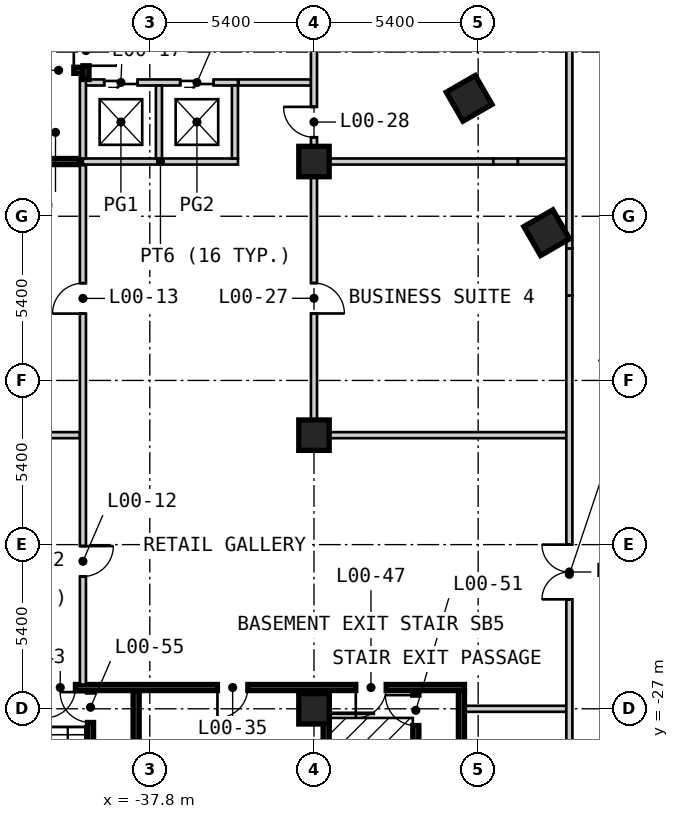
"""IFC4 building model, lengths in metres.
Left out: names, types, materials, properties, quantities, classifications, styles, units other than length and angle.
Written with IfcOpenShell. Run it as: python <this file> out.ifc"""

import sys

from ifc_helpers import new_model, si_unit, direction, frame, frame_2d, origin, origin_2d, place, context, subcontext, project, spatial, rectangle, extrude, element, fill, save


model = new_model("IFC4")
c1 = context("Model", 3, precision=1e-05, world=origin(), true_north=direction((0.0, 1.0)))
c2 = subcontext(c1, "Body", "Model", "MODEL_VIEW")
j1 = project(units=[si_unit("LENGTHUNIT", "METRE"), si_unit("PLANEANGLEUNIT", "RADIAN")], contexts=[c1])
p1 = place(None, origin())
s1 = spatial("IfcSite", under=j1, at=p1, CompositionType="ELEMENT")
p2 = place(p1, origin())
s2 = spatial("IfcBuilding", under=s1, at=p2, CompositionType="ELEMENT")
p3 = place(p2, origin())
s3 = spatial("IfcBuildingStorey", under=s2, at=p3, CompositionType="ELEMENT", Elevation=0.0)
for number, where, z_axis, x_axis in (
    (1, (-27.297, -6.921, 0.0), (0.0, 0.0, 1.0), (0.5, -0.866, 0.0)),
    (2, (-24.745, -11.341, 0.0), (0.0, 0.0, 1.0), (0.5, -0.866, 0.0)),
):
    element("IfcColumn", number, at=place(p3, frame(where, z_axis=z_axis, x_axis=x_axis)), inside=s3, PredefinedType="COLUMN", context=c2, shape_type="SweptSolid", body=[
        extrude(rectangle(XDim=1.1, YDim=1.1, at=origin_2d()), origin(), (0.0, 0.0, 1.0), 5.0),
    ])
for number, where, z_axis, x_axis in (
    (3, (-32.4, -27.0, 0.0), (0.0, 0.0, 1.0), (1.0, 0.0, 0.0)),
    (4, (-32.4, -18.0, 0.0), (0.0, 0.0, 1.0), (1.0, 0.0, 0.0)),
    (5, (-32.4, -9.0, 0.0), (0.0, 0.0, 1.0), (1.0, 0.0, 0.0)),
):
    element("IfcColumn", number, at=place(p3, frame(where, z_axis=z_axis, x_axis=x_axis)), inside=s3, PredefinedType="COLUMN", context=c2, shape_type="SweptSolid", body=[
        extrude(rectangle(XDim=1.0, YDim=1.0, at=origin_2d()), origin(), (0.0, 0.0, 1.0), 5.0),
    ])
p4 = place(p3, frame((-27.45, -27.0, 0.0), z_axis=(0.0, 0.0, 1.0), x_axis=(1.0, 0.0, 0.0)))
e6 = element("IfcWall", 6, at=p4, inside=s3, PredefinedType="SOLIDWALL", context=c2, shape_type="SweptSolid", body=[
    extrude(rectangle(XDim=3.35, YDim=0.2, at=frame_2d((1.675, 0.0))), origin(), (0.0, 0.0, 1.0), 4.55),
])
p5 = place(p3, frame((-42.6, -26.3, 0.0), z_axis=(0.0, 0.0, 1.0), x_axis=(1.0, 0.0, 0.0)))
e7 = element("IfcWall", 7, at=p5, inside=s3, PredefinedType="SOLIDWALL", context=c2, shape_type="SweptSolid", body=[
    extrude(rectangle(XDim=15.15, YDim=0.2, at=frame_2d((7.575, 0.0))), origin(), (0.0, 0.0, 1.0), 4.55),
])
p6 = place(p5, frame((8.025, 0.0, 0.0), z_axis=(0.0, 0.0, 1.0), x_axis=(-1.0, 0.0, 0.0)))
e8 = element("IfcOpeningElement", 8, at=p6, cuts=e7, PredefinedType="OPENING", context=c2, shape_type="SweptSolid", body=[
    extrude(rectangle(XDim=1.0, YDim=2.1, at=frame_2d((0.5, 1.05))), frame((0.0, 0.11, 0.0), z_axis=(0.0, -1.0, 0.0), x_axis=(1.0, 0.0, 0.0)), (0.0, 0.0, 1.0), 0.22),
])
p7 = place(p5, frame((2.354, 0.0, 0.0), z_axis=(0.0, 0.0, 1.0), x_axis=(-1.0, 0.0, 0.0)))
e9 = element("IfcOpeningElement", 9, at=p7, cuts=e7, PredefinedType="OPENING", context=c2, shape_type="SweptSolid", body=[
    extrude(rectangle(XDim=1.0, YDim=2.1, at=frame_2d((0.5, 1.05))), frame((0.0, 0.11, 0.0), z_axis=(0.0, -1.0, 0.0), x_axis=(1.0, 0.0, 0.0)), (0.0, 0.0, 1.0), 0.22),
])
p8 = place(p5, frame((12.575, 0.0, 0.0), z_axis=(0.0, 0.0, 1.0), x_axis=(-1.0, 0.0, 0.0)))
e10 = element("IfcOpeningElement", 10, at=p8, cuts=e7, PredefinedType="OPENING", context=c2, shape_type="SweptSolid", body=[
    extrude(rectangle(XDim=1.0, YDim=2.1, at=frame_2d((0.5, 1.05))), frame((0.0, 0.11, 0.0), z_axis=(0.0, -1.0, 0.0), x_axis=(1.0, 0.0, 0.0)), (0.0, 0.0, 1.0), 0.22),
])
p9 = place(p3, frame((-47.75, -18.0, 0.0), z_axis=(0.0, 0.0, 1.0), x_axis=(1.0, 0.0, 0.0)))
e11 = element("IfcWall", 11, at=p9, inside=s3, PredefinedType="PARTITIONING", context=c2, shape_type="SweptSolid", body=[
    extrude(rectangle(XDim=7.65, YDim=0.2, at=frame_2d((3.825, 0.0))), origin(), (0.0, 0.0, 1.0), 4.55),
])
p10 = place(p3, frame((-32.4, -18.0, 0.0), z_axis=(0.0, 0.0, 1.0), x_axis=(1.0, 0.0, 0.0)))
e12 = element("IfcWall", 12, at=p10, inside=s3, PredefinedType="PARTITIONING", context=c2, shape_type="SweptSolid", body=[
    extrude(rectangle(XDim=8.4, YDim=0.2, at=frame_2d((4.2, 0.0))), origin(), (0.0, 0.0, 1.0), 4.55),
])
p11 = place(p3, frame((-47.7, -9.0, 0.0), z_axis=(0.0, 0.0, 1.0), x_axis=(1.0, 0.0, 0.0)))
e13 = element("IfcWall", 13, at=p11, inside=s3, PredefinedType="SOLIDWALL", context=c2, shape_type="SweptSolid", body=[
    extrude(rectangle(XDim=7.58, YDim=0.2, at=frame_2d((3.79, 0.0))), origin(), (0.0, 0.0, 1.0), 4.55),
])
p12 = place(p3, frame((-40.0, -9.0, 0.0), z_axis=(0.0, 0.0, 1.0), x_axis=(1.0, 0.0, 0.0)))
e14 = element("IfcWall", 14, at=p12, inside=s3, PredefinedType="SOLIDWALL", context=c2, shape_type="SweptSolid", body=[
    extrude(rectangle(XDim=5.1, YDim=0.2, at=frame_2d((2.55, 0.0))), origin(), (0.0, 0.0, 1.0), 4.55),
])
p13 = place(p3, frame((-32.3, -9.0, 0.0), z_axis=(0.0, 0.0, 1.0), x_axis=(1.0, 0.0, 0.0)))
e15 = element("IfcWall", 15, at=p13, inside=s3, PredefinedType="PARTITIONING", context=c2, shape_type="SweptSolid", body=[
    extrude(rectangle(XDim=5.799, YDim=0.2, at=frame_2d((2.899, 0.0))), origin(), (0.0, 0.0, 1.0), 4.55),
])
p14 = place(p3, frame((-26.501, -9.0, 0.0), z_axis=(0.0, 0.0, 1.0), x_axis=(1.0, 0.0, 0.0)))
e16 = element("IfcWall", 16, at=p14, inside=s3, PredefinedType="PARTITIONING", context=c2, shape_type="SweptSolid", body=[
    extrude(rectangle(XDim=0.809, YDim=0.2, at=frame_2d((0.405, 0.0))), origin(), (0.0, 0.0, 1.0), 3.82),
])
p15 = place(p3, frame((-25.692, -9.0, 0.0), z_axis=(0.0, 0.0, 1.0), x_axis=(1.0, 0.0, 0.0)))
e17 = element("IfcWall", 17, at=p15, inside=s3, PredefinedType="PARTITIONING", context=c2, shape_type="SweptSolid", body=[
    extrude(rectangle(XDim=1.592, YDim=0.2, at=frame_2d((0.796, 0.0))), origin(), (0.0, 0.0, 1.0), 4.55),
])
p16 = place(p3, frame((-40.0, -6.4, 0.0), z_axis=(0.0, 0.0, 1.0), x_axis=(1.0, 0.0, 0.0)))
e18 = element("IfcWall", 18, at=p16, inside=s3, PredefinedType="SOLIDWALL", context=c2, shape_type="SweptSolid", body=[
    extrude(rectangle(XDim=5.1, YDim=0.2, at=frame_2d((2.55, 0.0))), origin(), (0.0, 0.0, 1.0), 4.55),
])
p17 = place(p16, frame((0.7, 0.0, 0.0)))
e19 = element("IfcOpeningElement", 19, at=p17, cuts=e18, PredefinedType="OPENING", context=c2, shape_type="SweptSolid", body=[
    extrude(rectangle(XDim=1.1, YDim=2.1, at=frame_2d((0.55, 1.05))), frame((0.0, 0.11, 0.0), z_axis=(0.0, -1.0, 0.0), x_axis=(1.0, 0.0, 0.0)), (0.0, 0.0, 1.0), 0.22),
])
p18 = place(p16, frame((3.2, 0.0, 0.0)))
e20 = element("IfcOpeningElement", 20, at=p18, cuts=e18, PredefinedType="OPENING", context=c2, shape_type="SweptSolid", body=[
    extrude(rectangle(XDim=1.1, YDim=2.1, at=frame_2d((0.55, 1.05))), frame((0.0, 0.11, 0.0), z_axis=(0.0, -1.0, 0.0), x_axis=(1.0, 0.0, 0.0)), (0.0, 0.0, 1.0), 0.22),
])
p19 = place(p3, frame((-34.88, -6.4, 0.0), z_axis=(0.0, 0.0, 1.0), x_axis=(1.0, 0.0, 0.0)))
e21 = element("IfcWall", 21, at=p19, inside=s3, PredefinedType="PARTITIONING", context=c2, shape_type="SweptSolid", body=[
    extrude(rectangle(XDim=2.38, YDim=0.2, at=frame_2d((1.19, 0.0))), origin(), (0.0, 0.0, 1.0), 4.55),
])
p20 = place(p3, frame((-42.75, -6.0, 0.0), z_axis=(0.0, 0.0, 1.0), x_axis=(1.0, 0.0, 0.0)))
e22 = element("IfcWall", 22, at=p20, inside=s3, PredefinedType="SOLIDWALL", context=c2, shape_type="SweptSolid", body=[
    extrude(rectangle(XDim=2.75, YDim=0.2, at=frame_2d((1.375, 0.0))), origin(), (0.0, 0.0, 1.0), 4.55),
])
p21 = place(p20, frame((2.45, 0.0, 0.0), z_axis=(0.0, 0.0, 1.0), x_axis=(-1.0, 0.0, 0.0)))
e23 = element("IfcOpeningElement", 23, at=p21, cuts=e22, PredefinedType="OPENING", context=c2, shape_type="SweptSolid", body=[
    extrude(rectangle(XDim=1.0, YDim=2.1, at=frame_2d((0.5, 1.05))), frame((0.0, 0.11, 0.0), z_axis=(0.0, -1.0, 0.0), x_axis=(1.0, 0.0, 0.0)), (0.0, 0.0, 1.0), 0.22),
])
p22 = place(p3, frame((-40.0, -26.2, 0.0), z_axis=(0.0, 0.0, 1.0), x_axis=(0.0, 1.0, 0.0)))
e24 = element("IfcWall", 24, at=p22, inside=s3, PredefinedType="PARTITIONING", context=c2, shape_type="SweptSolid", body=[
    extrude(rectangle(XDim=17.08, YDim=0.2, at=frame_2d((8.54, 0.0))), origin(), (0.0, 0.0, 1.0), 4.55),
])
p23 = place(p22, frame((3.552, 0.0, 0.0)))
e25 = element("IfcOpeningElement", 25, at=p23, cuts=e24, PredefinedType="OPENING", context=c2, shape_type="SweptSolid", body=[
    extrude(rectangle(XDim=1.0, YDim=2.1, at=frame_2d((0.5, 1.05))), frame((0.0, 0.11, 0.0), z_axis=(0.0, -1.0, 0.0), x_axis=(1.0, 0.0, 0.0)), (0.0, 0.0, 1.0), 0.22),
])
p24 = place(p22, frame((12.198, 0.0, 0.0)))
e26 = element("IfcOpeningElement", 26, at=p24, cuts=e24, PredefinedType="OPENING", context=c2, shape_type="SweptSolid", body=[
    extrude(rectangle(XDim=1.0, YDim=2.1, at=frame_2d((0.5, 1.05))), frame((0.0, 0.11, 0.0), z_axis=(0.0, -1.0, 0.0), x_axis=(1.0, 0.0, 0.0)), (0.0, 0.0, 1.0), 0.22),
])
p25 = place(p3, frame((-40.0, -8.9, 0.0), z_axis=(0.0, 0.0, 1.0), x_axis=(0.0, 1.0, 0.0)))
e27 = element("IfcWall", 27, at=p25, inside=s3, PredefinedType="SOLIDWALL", context=c2, shape_type="SweptSolid", body=[
    extrude(rectangle(XDim=2.8, YDim=0.2, at=frame_2d((1.4, 0.0))), origin(), (0.0, 0.0, 1.0), 4.55),
])
p26 = place(p3, frame((-39.9, -6.3, 0.0), z_axis=(0.0, 0.0, 1.0), x_axis=(0.0, 1.0, 0.0)))
e28 = element("IfcWall", 28, at=p26, inside=s3, PredefinedType="SOLIDWALL", context=c2, shape_type="SweptSolid", body=[
    extrude(rectangle(XDim=33.3, YDim=0.2, at=frame_2d((16.65, 0.0))), origin(), (0.0, 0.0, 1.0), 4.55),
])
p27 = place(p26, frame((10.302, 0.0, 0.0)))
e29 = element("IfcOpeningElement", 29, at=p27, cuts=e28, PredefinedType="OPENING", context=c2, shape_type="SweptSolid", body=[
    extrude(rectangle(XDim=1.0, YDim=2.1, at=frame_2d((0.5, 1.05))), frame((0.0, 0.11, 0.0), z_axis=(0.0, -1.0, 0.0), x_axis=(1.0, 0.0, 0.0)), (0.0, 0.0, 1.0), 0.22),
])
p28 = place(p26, frame((19.3, 0.0, 0.0)))
e30 = element("IfcOpeningElement", 30, at=p28, cuts=e28, PredefinedType="OPENING", context=c2, shape_type="SweptSolid", body=[
    extrude(rectangle(XDim=1.0, YDim=2.1, at=frame_2d((0.5, 1.05))), frame((0.0, 0.11, 0.0), z_axis=(0.0, -1.0, 0.0), x_axis=(1.0, 0.0, 0.0)), (0.0, 0.0, 1.0), 0.22),
])
p29 = place(p26, frame((28.298, 0.0, 0.0)))
e31 = element("IfcOpeningElement", 31, at=p29, cuts=e28, PredefinedType="OPENING", context=c2, shape_type="SweptSolid", body=[
    extrude(rectangle(XDim=1.0, YDim=2.1, at=frame_2d((0.5, 1.05))), frame((0.0, 0.11, 0.0), z_axis=(0.0, -1.0, 0.0), x_axis=(1.0, 0.0, 0.0)), (0.0, 0.0, 1.0), 0.22),
])
p30 = place(p26, frame((1.45, 0.0, 0.0), z_axis=(0.0, 0.0, 1.0), x_axis=(-1.0, 0.0, 0.0)))
e32 = element("IfcOpeningElement", 32, at=p30, cuts=e28, PredefinedType="OPENING", context=c2, shape_type="SweptSolid", body=[
    extrude(rectangle(XDim=1.0, YDim=2.1, at=frame_2d((0.5, 1.05))), frame((0.0, 0.11, 0.0), z_axis=(0.0, -1.0, 0.0), x_axis=(1.0, 0.0, 0.0)), (0.0, 0.0, 1.0), 0.22),
])
p31 = place(p3, frame((-39.75, -31.7, 0.0), z_axis=(0.0, 0.0, 1.0), x_axis=(0.0, 1.0, 0.0)))
e33 = element("IfcWall", 33, at=p31, inside=s3, PredefinedType="SOLIDWALL", context=c2, shape_type="SweptSolid", body=[
    extrude(rectangle(XDim=5.3, YDim=0.2, at=frame_2d((2.65, 0.0))), origin(), (0.0, 0.0, 1.0), 4.55),
])
p32 = place(p31, frame((5.25, 0.0, 0.0), z_axis=(0.0, 0.0, 1.0), x_axis=(-1.0, 0.0, 0.0)))
e34 = element("IfcOpeningElement", 34, at=p32, cuts=e33, PredefinedType="OPENING", context=c2, shape_type="SweptSolid", body=[
    extrude(rectangle(XDim=1.0, YDim=2.1, at=frame_2d((0.5, 1.05))), frame((0.0, 0.11, 0.0), z_axis=(0.0, -1.0, 0.0), x_axis=(1.0, 0.0, 0.0)), (0.0, 0.0, 1.0), 0.22),
])
p33 = place(p3, frame((-38.25, -31.7, 0.0), z_axis=(0.0, 0.0, 1.0), x_axis=(0.0, 1.0, 0.0)))
e35 = element("IfcWall", 35, at=p33, inside=s3, PredefinedType="SOLIDWALL", context=c2, shape_type="SweptSolid", body=[
    extrude(rectangle(XDim=5.3, YDim=0.2, at=frame_2d((2.65, 0.0))), origin(), (0.0, 0.0, 1.0), 4.55),
])
for number, where, z_axis, x_axis in (
    (36, (-37.5, -8.9, 0.0), (0.0, 0.0, 1.0), (0.0, 1.0, 0.0)),
    (37, (-35.0, -8.9, 0.0), (0.0, 0.0, 1.0), (0.0, 1.0, 0.0)),
):
    element("IfcWall", number, at=place(p3, frame(where, z_axis=z_axis, x_axis=x_axis)), inside=s3, PredefinedType="SOLIDWALL", context=c2, shape_type="SweptSolid", body=[
        extrude(rectangle(XDim=2.4, YDim=0.2, at=frame_2d((1.2, 0.0))), origin(), (0.0, 0.0, 1.0), 4.55),
    ])
p34 = place(p3, frame((-32.4, -17.9, 0.0), z_axis=(0.0, 0.0, 1.0), x_axis=(0.0, 1.0, 0.0)))
e38 = element("IfcWall", 38, at=p34, inside=s3, PredefinedType="PARTITIONING", context=c2, shape_type="SweptSolid", body=[
    extrude(rectangle(XDim=17.8, YDim=0.2, at=frame_2d((8.9, 0.0))), origin(), (0.0, 0.0, 1.0), 4.55),
])
p35 = place(p34, frame((4.902, 0.0, 0.0), z_axis=(0.0, 0.0, 1.0), x_axis=(-1.0, 0.0, 0.0)))
e39 = element("IfcOpeningElement", 39, at=p35, cuts=e38, PredefinedType="OPENING", context=c2, shape_type="SweptSolid", body=[
    extrude(rectangle(XDim=1.0, YDim=2.1, at=frame_2d((0.5, 1.05))), frame((0.0, 0.11, 0.0), z_axis=(0.0, -1.0, 0.0), x_axis=(1.0, 0.0, 0.0)), (0.0, 0.0, 1.0), 0.22),
])
p36 = place(p34, frame((10.698, 0.0, 0.0), z_axis=(0.0, 0.0, 1.0), x_axis=(-1.0, 0.0, 0.0)))
e40 = element("IfcOpeningElement", 40, at=p36, cuts=e38, PredefinedType="OPENING", context=c2, shape_type="SweptSolid", body=[
    extrude(rectangle(XDim=1.0, YDim=2.1, at=frame_2d((0.5, 1.05))), frame((0.0, 0.11, 0.0), z_axis=(0.0, -1.0, 0.0), x_axis=(1.0, 0.0, 0.0)), (0.0, 0.0, 1.0), 0.22),
])
p37 = place(p3, frame((-32.0, -31.7, 0.0), z_axis=(0.0, 0.0, 1.0), x_axis=(0.0, 1.0, 0.0)))
e41 = element("IfcWall", 41, at=p37, inside=s3, PredefinedType="SOLIDWALL", context=c2, shape_type="SweptSolid", body=[
    extrude(rectangle(XDim=5.3, YDim=0.2, at=frame_2d((2.65, 0.0))), origin(), (0.0, 0.0, 1.0), 4.55),
])
p38 = place(p3, frame((-29.05, -31.7, 0.0), z_axis=(0.0, 0.0, 1.0), x_axis=(0.0, 1.0, 0.0)))
e42 = element("IfcWall", 42, at=p38, inside=s3, PredefinedType="SOLIDWALL", context=c2, shape_type="SweptSolid", body=[
    extrude(rectangle(XDim=5.3, YDim=0.2, at=frame_2d((2.65, 0.0))), origin(), (0.0, 0.0, 1.0), 4.55),
])
p39 = place(p38, frame((5.15, 0.0, 0.0), z_axis=(0.0, 0.0, 1.0), x_axis=(-1.0, 0.0, 0.0)))
e43 = element("IfcOpeningElement", 43, at=p39, cuts=e42, PredefinedType="OPENING", context=c2, shape_type="SweptSolid", body=[
    extrude(rectangle(XDim=1.0, YDim=2.1, at=frame_2d((0.5, 1.05))), frame((0.0, 0.11, 0.0), z_axis=(0.0, -1.0, 0.0), x_axis=(1.0, 0.0, 0.0)), (0.0, 0.0, 1.0), 0.22),
])
p40 = place(p3, frame((-27.55, -31.7, 0.0), z_axis=(0.0, 0.0, 1.0), x_axis=(0.0, 1.0, 0.0)))
e44 = element("IfcWall", 44, at=p40, inside=s3, PredefinedType="SOLIDWALL", context=c2, shape_type="SweptSolid", body=[
    extrude(rectangle(XDim=5.3, YDim=0.2, at=frame_2d((2.65, 0.0))), origin(), (0.0, 0.0, 1.0), 4.55),
])
p41 = place(p3, frame((-24.0, -31.75, 0.0), z_axis=(0.0, 0.0, 1.0), x_axis=(0.0, 1.0, 0.0)))
e45 = element("IfcWall", 45, at=p41, inside=s3, PredefinedType="SOLIDWALL", context=c2, shape_type="SweptSolid", body=[
    extrude(rectangle(XDim=18.346, YDim=0.2, at=frame_2d((9.173, 0.0))), origin(), (0.0, 0.0, 1.0), 4.55),
])
p42 = place(p41, frame((2.05, 0.0, 0.0), z_axis=(0.0, 0.0, 1.0), x_axis=(-1.0, 0.0, 0.0)))
e46 = element("IfcOpeningElement", 46, at=p42, cuts=e45, PredefinedType="OPENING", context=c2, shape_type="SweptSolid", body=[
    extrude(rectangle(XDim=1.0, YDim=2.1, at=frame_2d((0.5, 1.05))), frame((0.0, 0.11, 0.0), z_axis=(0.0, -1.0, 0.0), x_axis=(1.0, 0.0, 0.0)), (0.0, 0.0, 1.0), 0.22),
])
p43 = place(p41, frame((8.35, 0.0, 0.0)))
e47 = element("IfcOpeningElement", 47, at=p43, cuts=e45, PredefinedType="OPENING", context=c2, shape_type="SweptSolid", body=[
    extrude(rectangle(XDim=1.8, YDim=2.1, at=frame_2d((0.9, 1.05))), frame((0.0, 0.11, 0.0), z_axis=(0.0, -1.0, 0.0), x_axis=(1.0, 0.0, 0.0)), (0.0, 0.0, 1.0), 0.22),
])
p44 = place(p3, frame((-24.0, -13.404, 0.0), z_axis=(0.0, 0.0, 1.0), x_axis=(0.0, 1.0, 0.0)))
e48 = element("IfcWall", 48, at=p44, inside=s3, PredefinedType="SOLIDWALL", context=c2, shape_type="SweptSolid", body=[
    extrude(rectangle(XDim=1.546, YDim=0.2, at=frame_2d((0.773, 0.0))), origin(), (0.0, 0.0, 1.0), 3.82),
])
p45 = place(p3, frame((-24.0, -11.858, 0.0), z_axis=(0.0, 0.0, 1.0), x_axis=(0.0, 1.0, 0.0)))
e49 = element("IfcWall", 49, at=p45, inside=s3, PredefinedType="SOLIDWALL", context=c2, shape_type="SweptSolid", body=[
    extrude(rectangle(XDim=13.758, YDim=0.2, at=frame_2d((6.879, 0.0))), origin(), (0.0, 0.0, 1.0), 4.55),
])
p46 = place(p23, origin())
e50 = element("IfcDoor", 50, at=p46, inside=s3, OperationType="SINGLE_SWING_RIGHT", PredefinedType="DOOR", context=c2, shape_type="SweptSolid", body=[
    extrude(rectangle(XDim=1.0, YDim=2.1, at=frame_2d((0.5, 1.05))), frame((0.0, 0.025, 0.0), z_axis=(0.0, -1.0, 0.0), x_axis=(1.0, 0.0, 0.0)), (0.0, 0.0, 1.0), 0.05),
])
fill(e25, e50)
p47 = place(p24, origin())
e51 = element("IfcDoor", 51, at=p47, inside=s3, OperationType="SINGLE_SWING_LEFT", PredefinedType="DOOR", context=c2, shape_type="SweptSolid", body=[
    extrude(rectangle(XDim=1.0, YDim=2.1, at=frame_2d((0.5, 1.05))), frame((0.0, 0.025, 0.0), z_axis=(0.0, -1.0, 0.0), x_axis=(1.0, 0.0, 0.0)), (0.0, 0.0, 1.0), 0.05),
])
fill(e26, e51)
p48 = place(p30, origin())
e52 = element("IfcDoor", 52, at=p48, inside=s3, OperationType="SINGLE_SWING_RIGHT", PredefinedType="DOOR", context=c2, shape_type="SweptSolid", body=[
    extrude(rectangle(XDim=1.0, YDim=2.1, at=frame_2d((0.5, 1.05))), frame((0.0, 0.025, 0.0), z_axis=(0.0, -1.0, 0.0), x_axis=(1.0, 0.0, 0.0)), (0.0, 0.0, 1.0), 0.05),
])
fill(e32, e52)
p49 = place(p35, origin())
e53 = element("IfcDoor", 53, at=p49, inside=s3, OperationType="SINGLE_SWING_RIGHT", PredefinedType="DOOR", context=c2, shape_type="SweptSolid", body=[
    extrude(rectangle(XDim=1.0, YDim=2.1, at=frame_2d((0.5, 1.05))), frame((0.0, 0.025, 0.0), z_axis=(0.0, -1.0, 0.0), x_axis=(1.0, 0.0, 0.0)), (0.0, 0.0, 1.0), 0.05),
])
fill(e39, e53)
p50 = place(p36, origin())
e54 = element("IfcDoor", 54, at=p50, inside=s3, OperationType="SINGLE_SWING_LEFT", PredefinedType="DOOR", context=c2, shape_type="SweptSolid", body=[
    extrude(rectangle(XDim=1.0, YDim=2.1, at=frame_2d((0.5, 1.05))), frame((0.0, 0.025, 0.0), z_axis=(0.0, -1.0, 0.0), x_axis=(1.0, 0.0, 0.0)), (0.0, 0.0, 1.0), 0.05),
])
fill(e40, e54)
p51 = place(p6, origin())
e55 = element("IfcDoor", 55, at=p51, inside=s3, OperationType="SINGLE_SWING_RIGHT", PredefinedType="DOOR", context=c2, shape_type="SweptSolid", body=[
    extrude(rectangle(XDim=1.0, YDim=2.1, at=frame_2d((0.5, 1.05))), frame((0.0, 0.025, 0.0), z_axis=(0.0, -1.0, 0.0), x_axis=(1.0, 0.0, 0.0)), (0.0, 0.0, 1.0), 0.05),
])
fill(e8, e55)
p52 = place(p7, origin())
e56 = element("IfcDoor", 56, at=p52, inside=s3, OperationType="SINGLE_SWING_RIGHT", PredefinedType="DOOR", context=c2, shape_type="SweptSolid", body=[
    extrude(rectangle(XDim=1.0, YDim=2.1, at=frame_2d((0.5, 1.05))), frame((0.0, 0.025, 0.0), z_axis=(0.0, -1.0, 0.0), x_axis=(1.0, 0.0, 0.0)), (0.0, 0.0, 1.0), 0.05),
])
fill(e9, e56)
p53 = place(p8, origin())
e57 = element("IfcDoor", 57, at=p53, inside=s3, OperationType="SINGLE_SWING_RIGHT", PredefinedType="DOOR", context=c2, shape_type="SweptSolid", body=[
    extrude(rectangle(XDim=1.0, YDim=2.1, at=frame_2d((0.5, 1.05))), frame((0.0, 0.025, 0.0), z_axis=(0.0, -1.0, 0.0), x_axis=(1.0, 0.0, 0.0)), (0.0, 0.0, 1.0), 0.05),
])
fill(e10, e57)
p54 = place(p39, origin())
e58 = element("IfcDoor", 58, at=p54, inside=s3, OperationType="SINGLE_SWING_LEFT", PredefinedType="DOOR", context=c2, shape_type="SweptSolid", body=[
    extrude(rectangle(XDim=1.0, YDim=2.1, at=frame_2d((0.5, 1.05))), frame((0.0, 0.025, 0.0), z_axis=(0.0, -1.0, 0.0), x_axis=(1.0, 0.0, 0.0)), (0.0, 0.0, 1.0), 0.05),
])
fill(e43, e58)
p55 = place(p32, origin())
e59 = element("IfcDoor", 59, at=p55, inside=s3, OperationType="SINGLE_SWING_LEFT", PredefinedType="DOOR", context=c2, shape_type="SweptSolid", body=[
    extrude(rectangle(XDim=1.0, YDim=2.1, at=frame_2d((0.5, 1.05))), frame((0.0, 0.025, 0.0), z_axis=(0.0, -1.0, 0.0), x_axis=(1.0, 0.0, 0.0)), (0.0, 0.0, 1.0), 0.05),
])
fill(e34, e59)
p56 = place(p17, origin())
e60 = element("IfcDoor", 60, at=p56, inside=s3, OperationType="DOUBLE_DOOR_SLIDING", PredefinedType="DOOR", context=c2, shape_type="SweptSolid", body=[
    extrude(rectangle(XDim=1.1, YDim=2.1, at=frame_2d((0.55, 1.05))), frame((0.0, 0.025, 0.0), z_axis=(0.0, -1.0, 0.0), x_axis=(1.0, 0.0, 0.0)), (0.0, 0.0, 1.0), 0.05),
])
fill(e19, e60)
p57 = place(p18, origin())
e61 = element("IfcDoor", 61, at=p57, inside=s3, OperationType="DOUBLE_DOOR_SLIDING", PredefinedType="DOOR", context=c2, shape_type="SweptSolid", body=[
    extrude(rectangle(XDim=1.1, YDim=2.1, at=frame_2d((0.55, 1.05))), frame((0.0, 0.025, 0.0), z_axis=(0.0, -1.0, 0.0), x_axis=(1.0, 0.0, 0.0)), (0.0, 0.0, 1.0), 0.05),
])
fill(e20, e61)
p58 = place(p43, origin())
e62 = element("IfcDoor", 62, at=p58, inside=s3, OperationType="DOUBLE_DOOR_SINGLE_SWING", PredefinedType="DOOR", context=c2, shape_type="SweptSolid", body=[
    extrude(rectangle(XDim=1.8, YDim=2.1, at=frame_2d((0.9, 1.05))), frame((0.0, 0.025, 0.0), z_axis=(0.0, -1.0, 0.0), x_axis=(1.0, 0.0, 0.0)), (0.0, 0.0, 1.0), 0.05),
])
fill(e47, e62)
p59 = place(p21, origin())
e63 = element("IfcDoor", 63, at=p59, inside=s3, OperationType="SINGLE_SWING_LEFT", PredefinedType="DOOR", context=c2, shape_type="SweptSolid", body=[
    extrude(rectangle(XDim=1.0, YDim=2.1, at=frame_2d((0.5, 1.05))), frame((0.0, 0.025, 0.0), z_axis=(0.0, -1.0, 0.0), x_axis=(1.0, 0.0, 0.0)), (0.0, 0.0, 1.0), 0.05),
])
fill(e23, e63)
save(model, sys.argv[1])
